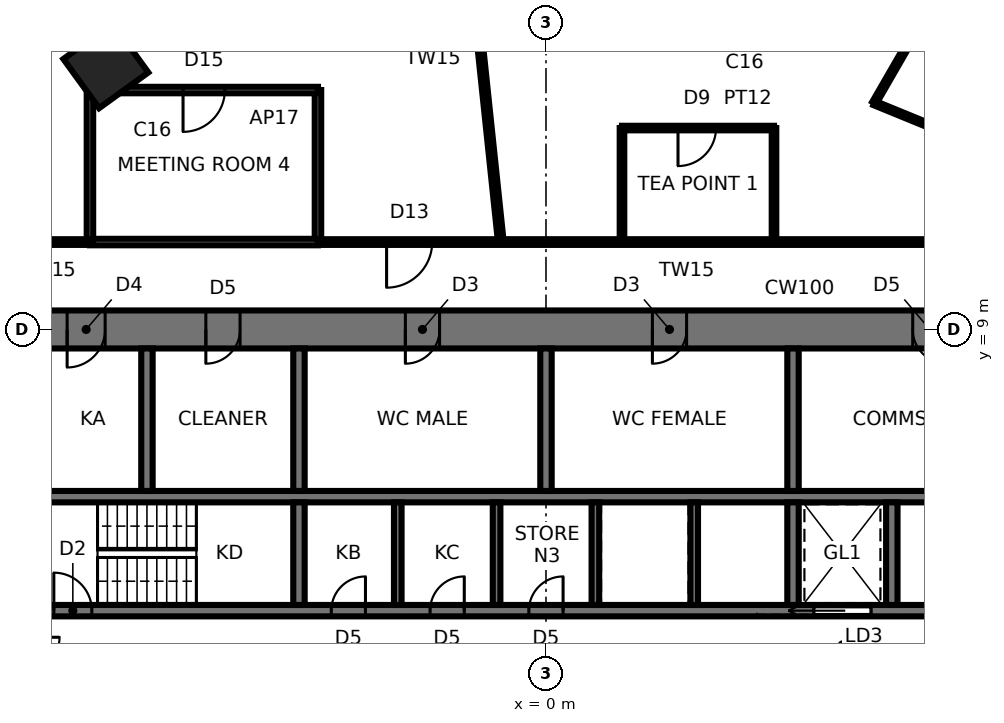
"""IFC4 building model, lengths in metres.
Left out: names, types, materials, properties, quantities, classifications, styles, units other than length and angle.
Written with IfcOpenShell. Run it as: python <this file> out.ifc"""

import sys

from ifc_helpers import new_model, si_unit, direction, frame, frame_2d, origin, origin_2d, place, context, subcontext, project, spatial, rectangle, extrude, element, fill, save


model = new_model("IFC4")
c1 = context("Model", 3, precision=1e-05, world=origin(), true_north=direction((0.0, 1.0)))
c2 = subcontext(c1, "Body", "Model", "MODEL_VIEW")
j1 = project(units=[si_unit("LENGTHUNIT", "METRE"), si_unit("PLANEANGLEUNIT", "RADIAN")], contexts=[c1])
p1 = place(None, origin())
s1 = spatial("IfcSite", under=j1, at=p1, CompositionType="ELEMENT")
p2 = place(p1, origin())
s2 = spatial("IfcBuilding", under=s1, at=p2, CompositionType="ELEMENT")
p3 = place(p2, frame((0.0, 0.0, 127.5)))
s3 = spatial("IfcBuildingStorey", under=s2, at=p3, CompositionType="ELEMENT", Elevation=127.5)
p4 = place(p3, frame((-11.581, 15.94, 0.0), z_axis=(0.0, 0.0, 1.0), x_axis=(-0.587785252292, 0.809016994375, 0.0)))
e1 = element("IfcColumn", 1, at=p4, inside=s3, PredefinedType="COLUMN", context=c2, shape_type="SweptSolid", body=[
    extrude(rectangle(XDim=1.6, YDim=1.6, at=origin_2d()), origin(), (0.0, 0.0, 1.0), 3.9),
])
p5 = place(p3, frame((13.2, 9.0, 0.0), z_axis=(0.0, 0.0, 1.0), x_axis=(-1.0, 0.0, 0.0)))
e2 = element("IfcWall", 2, at=p5, inside=s3, PredefinedType="SHEAR", context=c2, shape_type="SweptSolid", body=[
    extrude(rectangle(XDim=26.4, YDim=1.0, at=frame_2d((13.2, 0.0))), origin(), (0.0, 0.0, 1.0), 3.9),
])
p6 = place(p5, frame((2.65, 0.0, 0.0)))
e3 = element("IfcOpeningElement", 3, at=p6, cuts=e2, PredefinedType="OPENING", context=c2, shape_type="SweptSolid", body=[
    extrude(rectangle(XDim=0.9, YDim=2.1, at=frame_2d((0.45, 1.05))), frame((0.0, 0.51, 0.0), z_axis=(0.0, -1.0, 0.0), x_axis=(1.0, 0.0, 0.0)), (0.0, 0.0, 1.0), 1.02),
])
p7 = place(p5, frame((9.5, 0.0, 0.0)))
e4 = element("IfcOpeningElement", 4, at=p7, cuts=e2, PredefinedType="OPENING", context=c2, shape_type="SweptSolid", body=[
    extrude(rectangle(XDim=0.9, YDim=2.1, at=frame_2d((0.45, 1.05))), frame((0.0, 0.51, 0.0), z_axis=(0.0, -1.0, 0.0), x_axis=(1.0, 0.0, 0.0)), (0.0, 0.0, 1.0), 1.02),
])
p8 = place(p5, frame((16.0, 0.0, 0.0)))
e5 = element("IfcOpeningElement", 5, at=p8, cuts=e2, PredefinedType="OPENING", context=c2, shape_type="SweptSolid", body=[
    extrude(rectangle(XDim=0.9, YDim=2.1, at=frame_2d((0.45, 1.05))), frame((0.0, 0.51, 0.0), z_axis=(0.0, -1.0, 0.0), x_axis=(1.0, 0.0, 0.0)), (0.0, 0.0, 1.0), 1.02),
])
p9 = place(p5, frame((21.25, 0.0, 0.0)))
e6 = element("IfcOpeningElement", 6, at=p9, cuts=e2, PredefinedType="OPENING", context=c2, shape_type="SweptSolid", body=[
    extrude(rectangle(XDim=0.9, YDim=2.1, at=frame_2d((0.45, 1.05))), frame((0.0, 0.51, 0.0), z_axis=(0.0, -1.0, 0.0), x_axis=(1.0, 0.0, 0.0)), (0.0, 0.0, 1.0), 1.02),
])
p10 = place(p5, frame((24.8, 0.0, 0.0)))
e7 = element("IfcOpeningElement", 7, at=p10, cuts=e2, PredefinedType="OPENING", context=c2, shape_type="SweptSolid", body=[
    extrude(rectangle(XDim=1.0, YDim=2.1, at=frame_2d((0.5, 1.05))), frame((0.0, 0.51, 0.0), z_axis=(0.0, -1.0, 0.0), x_axis=(1.0, 0.0, 0.0)), (0.0, 0.0, 1.0), 1.02),
])
p11 = place(p3, frame((-13.2, 1.6, 0.0), z_axis=(0.0, 0.0, 1.0), x_axis=(1.0, 0.0, 0.0)))
e8 = element("IfcWall", 8, at=p11, inside=s3, PredefinedType="SHEAR", context=c2, shape_type="SweptSolid", body=[
    extrude(rectangle(XDim=26.4, YDim=0.3, at=frame_2d((13.2, 0.0))), origin(), (0.0, 0.0, 1.0), 3.9),
])
p12 = place(p11, frame((0.25, 0.0, 0.0)))
e9 = element("IfcOpeningElement", 9, at=p12, cuts=e8, PredefinedType="OPENING", context=c2, shape_type="SweptSolid", body=[
    extrude(rectangle(XDim=1.0, YDim=2.1, at=frame_2d((0.5, 1.05))), frame((0.0, 0.16, 0.0), z_axis=(0.0, -1.0, 0.0), x_axis=(1.0, 0.0, 0.0)), (0.0, 0.0, 1.0), 0.32),
])
p13 = place(p11, frame((20.25, 0.0, 0.0)))
e10 = element("IfcOpeningElement", 10, at=p13, cuts=e8, PredefinedType="OPENING", context=c2, shape_type="SweptSolid", body=[
    extrude(rectangle(XDim=1.5, YDim=2.4, at=frame_2d((0.75, 1.2))), frame((0.0, 0.16, 0.0), z_axis=(0.0, -1.0, 0.0), x_axis=(1.0, 0.0, 0.0)), (0.0, 0.0, 1.0), 0.32),
])
p14 = place(p11, frame((7.55, 0.0, 0.0)))
e11 = element("IfcOpeningElement", 11, at=p14, cuts=e8, PredefinedType="OPENING", context=c2, shape_type="SweptSolid", body=[
    extrude(rectangle(XDim=0.9, YDim=2.1, at=frame_2d((0.45, 1.05))), frame((0.0, 0.16, 0.0), z_axis=(0.0, -1.0, 0.0), x_axis=(1.0, 0.0, 0.0)), (0.0, 0.0, 1.0), 0.32),
])
p15 = place(p11, frame((10.15, 0.0, 0.0)))
e12 = element("IfcOpeningElement", 12, at=p15, cuts=e8, PredefinedType="OPENING", context=c2, shape_type="SweptSolid", body=[
    extrude(rectangle(XDim=0.9, YDim=2.1, at=frame_2d((0.45, 1.05))), frame((0.0, 0.16, 0.0), z_axis=(0.0, -1.0, 0.0), x_axis=(1.0, 0.0, 0.0)), (0.0, 0.0, 1.0), 0.32),
])
p16 = place(p11, frame((12.75, 0.0, 0.0)))
e13 = element("IfcOpeningElement", 13, at=p16, cuts=e8, PredefinedType="OPENING", context=c2, shape_type="SweptSolid", body=[
    extrude(rectangle(XDim=0.9, YDim=2.1, at=frame_2d((0.45, 1.05))), frame((0.0, 0.16, 0.0), z_axis=(0.0, -1.0, 0.0), x_axis=(1.0, 0.0, 0.0)), (0.0, 0.0, 1.0), 0.32),
])
p17 = place(p11, frame((24.15, 0.0, 0.0)))
e14 = element("IfcOpeningElement", 14, at=p17, cuts=e8, PredefinedType="OPENING", context=c2, shape_type="SweptSolid", body=[
    extrude(rectangle(XDim=0.9, YDim=2.1, at=frame_2d((0.45, 1.05))), frame((0.0, 0.16, 0.0), z_axis=(0.0, -1.0, 0.0), x_axis=(1.0, 0.0, 0.0)), (0.0, 0.0, 1.0), 0.32),
])
p18 = place(p3, frame((-13.2, 4.6, 0.0), z_axis=(0.0, 0.0, 1.0), x_axis=(1.0, 0.0, 0.0)))
e15 = element("IfcWall", 15, at=p18, inside=s3, PredefinedType="SHEAR", context=c2, shape_type="SweptSolid", body=[
    extrude(rectangle(XDim=26.4, YDim=0.3, at=frame_2d((13.2, 0.0))), origin(), (0.0, 0.0, 1.0), 3.9),
])
p19 = place(p3, frame((-6.5, 1.75, 0.0), z_axis=(0.0, 0.0, 1.0), x_axis=(0.0, 1.0, 0.0)))
e16 = element("IfcWall", 16, at=p19, inside=s3, PredefinedType="SHEAR", context=c2, shape_type="SweptSolid", body=[
    extrude(rectangle(XDim=2.7, YDim=0.3, at=frame_2d((1.35, 0.0))), origin(), (0.0, 0.0, 1.0), 3.9),
])
p20 = place(p3, frame((-6.5, 4.75, 0.0), z_axis=(0.0, 0.0, 1.0), x_axis=(0.0, 1.0, 0.0)))
e17 = element("IfcWall", 17, at=p20, inside=s3, PredefinedType="SHEAR", context=c2, shape_type="SweptSolid", body=[
    extrude(rectangle(XDim=3.75, YDim=0.3, at=frame_2d((1.875, 0.0))), origin(), (0.0, 0.0, 1.0), 3.9),
])
p21 = place(p3, frame((6.5, 1.75, 0.0), z_axis=(0.0, 0.0, 1.0), x_axis=(0.0, 1.0, 0.0)))
e18 = element("IfcWall", 18, at=p21, inside=s3, PredefinedType="SHEAR", context=c2, shape_type="SweptSolid", body=[
    extrude(rectangle(XDim=2.7, YDim=0.3, at=frame_2d((1.35, 0.0))), origin(), (0.0, 0.0, 1.0), 3.9),
])
p22 = place(p3, frame((6.5, 4.75, 0.0), z_axis=(0.0, 0.0, 1.0), x_axis=(0.0, 1.0, 0.0)))
e19 = element("IfcWall", 19, at=p22, inside=s3, PredefinedType="SHEAR", context=c2, shape_type="SweptSolid", body=[
    extrude(rectangle(XDim=3.75, YDim=0.3, at=frame_2d((1.875, 0.0))), origin(), (0.0, 0.0, 1.0), 3.9),
])
for number, where, z_axis, x_axis in (
    (20, (-3.9, 1.75, 0.0), (0.0, 0.0, 1.0), (0.0, 1.0, 0.0)),
    (21, (-1.3, 1.75, 0.0), (0.0, 0.0, 1.0), (0.0, 1.0, 0.0)),
    (22, (1.3, 1.75, 0.0), (0.0, 0.0, 1.0), (0.0, 1.0, 0.0)),
    (23, (3.9, 1.75, 0.0), (0.0, 0.0, 1.0), (0.0, 1.0, 0.0)),
):
    element("IfcWall", number, at=place(p3, frame(where, z_axis=z_axis, x_axis=x_axis)), inside=s3, PredefinedType="SHEAR", context=c2, shape_type="SweptSolid", body=[
        extrude(rectangle(XDim=2.7, YDim=0.2, at=frame_2d((1.35, 0.0))), origin(), (0.0, 0.0, 1.0), 3.9),
    ])
for number, where, z_axis, x_axis in (
    (24, (0.0, 4.75, 0.0), (0.0, 0.0, 1.0), (0.0, 1.0, 0.0)),
    (25, (-10.5, 4.75, 0.0), (0.0, 0.0, 1.0), (0.0, 1.0, 0.0)),
):
    element("IfcWall", number, at=place(p3, frame(where, z_axis=z_axis, x_axis=x_axis)), inside=s3, PredefinedType="SHEAR", context=c2, shape_type="SweptSolid", body=[
        extrude(rectangle(XDim=3.75, YDim=0.3, at=frame_2d((1.875, 0.0))), origin(), (0.0, 0.0, 1.0), 3.9),
    ])
p23 = place(p3, frame((9.1, 1.75, 0.0), z_axis=(0.0, 0.0, 1.0), x_axis=(0.0, 1.0, 0.0)))
e26 = element("IfcWall", 26, at=p23, inside=s3, PredefinedType="SHEAR", context=c2, shape_type="SweptSolid", body=[
    extrude(rectangle(XDim=2.7, YDim=0.3, at=frame_2d((1.35, 0.0))), origin(), (0.0, 0.0, 1.0), 3.9),
])
p24 = place(p3, frame((8.637, 14.959, 0.0), z_axis=(0.0, 0.0, 1.0), x_axis=(0.925323544258, -0.379178504719, 0.0)))
e27 = element("IfcWall", 27, at=p24, inside=s3, PredefinedType="PARTITIONING", context=c2, shape_type="SweptSolid", body=[
    extrude(rectangle(XDim=3.815, YDim=0.12, at=frame_2d((1.907, 0.0))), origin(), (0.0, 0.0, 1.0), 3.74),
])
p25 = place(p3, frame((11.137, 19.289, 0.0), z_axis=(0.0, 0.0, 1.0), x_axis=(-0.499983091616, -0.866035165624, 0.0)))
e28 = element("IfcWall", 28, at=p25, inside=s3, PredefinedType="PARTITIONING", context=c2, shape_type="SweptSolid", body=[
    extrude(rectangle(XDim=5.0, YDim=0.12, at=frame_2d((2.5, 0.0))), origin(), (0.0, 0.0, 1.0), 3.74),
])
p26 = place(p3, frame((6.0, 11.3, 0.0), z_axis=(0.0, 0.0, 1.0), x_axis=(0.0, 1.0, 0.0)))
e29 = element("IfcWall", 29, at=p26, inside=s3, PredefinedType="PARTITIONING", context=c2, shape_type="SweptSolid", body=[
    extrude(rectangle(XDim=3.0, YDim=0.12, at=frame_2d((1.5, 0.0))), origin(), (0.0, 0.0, 1.0), 3.74),
])
p27 = place(p3, frame((16.0, 11.3, 0.0), z_axis=(0.0, 0.0, 1.0), x_axis=(-1.0, 0.0, 0.0)))
e30 = element("IfcWall", 30, at=p27, inside=s3, PredefinedType="PARTITIONING", context=c2, shape_type="SweptSolid", body=[
    extrude(rectangle(XDim=22.0, YDim=0.15, at=frame_2d((11.0, 0.0))), origin(), (0.0, 0.0, 1.0), 3.74),
])
p28 = place(p27, frame((4.4, 0.0, 0.0)))
e31 = element("IfcOpeningElement", 31, at=p28, cuts=e30, PredefinedType="OPENING", context=c2, shape_type="SweptSolid", body=[
    extrude(rectangle(XDim=1.2, YDim=2.4, at=frame_2d((0.6, 1.2))), frame((0.0, 0.085, 0.0), z_axis=(0.0, -1.0, 0.0), x_axis=(1.0, 0.0, 0.0)), (0.0, 0.0, 1.0), 0.17),
])
p29 = place(p27, frame((18.994, 0.0, 0.0)))
e32 = element("IfcOpeningElement", 32, at=p29, cuts=e30, PredefinedType="OPENING", context=c2, shape_type="SweptSolid", body=[
    extrude(rectangle(XDim=1.2, YDim=2.4, at=frame_2d((0.6, 1.2))), frame((0.0, 0.085, 0.0), z_axis=(0.0, -1.0, 0.0), x_axis=(1.0, 0.0, 0.0)), (0.0, 0.0, 1.0), 0.17),
])
p30 = place(p3, frame((6.0, 14.3, 0.0), z_axis=(0.0, 0.0, 1.0), x_axis=(-1.0, 0.0, 0.0)))
e33 = element("IfcWall", 33, at=p30, inside=s3, PredefinedType="PARTITIONING", context=c2, shape_type="SweptSolid", body=[
    extrude(rectangle(XDim=4.0, YDim=0.12, at=frame_2d((2.0, 0.0))), origin(), (0.0, 0.0, 1.0), 3.74),
])
p31 = place(p30, frame((1.526, 0.0, 0.0)))
e34 = element("IfcOpeningElement", 34, at=p31, cuts=e33, PredefinedType="OPENING", context=c2, shape_type="SweptSolid", body=[
    extrude(rectangle(XDim=1.0, YDim=2.4, at=frame_2d((0.5, 1.2))), frame((0.0, 0.07, 0.0), z_axis=(0.0, -1.0, 0.0), x_axis=(1.0, 0.0, 0.0)), (0.0, 0.0, 1.0), 0.14),
])
p32 = place(p3, frame((2.0, 14.3, 0.0), z_axis=(0.0, 0.0, 1.0), x_axis=(0.0, -1.0, 0.0)))
e35 = element("IfcWall", 35, at=p32, inside=s3, PredefinedType="PARTITIONING", context=c2, shape_type="SweptSolid", body=[
    extrude(rectangle(XDim=3.0, YDim=0.12, at=frame_2d((1.5, 0.0))), origin(), (0.0, 0.0, 1.0), 3.74),
])
p33 = place(p3, frame((-1.188, 11.3, 0.0), z_axis=(0.0, 0.0, 1.0), x_axis=(-0.104522843542, 0.994522486009, 0.0)))
e36 = element("IfcWall", 36, at=p33, inside=s3, PredefinedType="PARTITIONING", context=c2, shape_type="SweptSolid", body=[
    extrude(rectangle(XDim=9.967, YDim=0.15, at=frame_2d((4.983, 0.0))), origin(), (0.0, 0.0, 1.0), 3.74),
])
p34 = place(p3, frame((-6.0, 11.3, 0.0), z_axis=(0.0, 0.0, 1.0), x_axis=(0.0, 1.0, 0.0)))
e37 = element("IfcWall", 37, at=p34, inside=s3, PredefinedType="PARTITIONING", context=c2, shape_type="SweptSolid", body=[
    extrude(rectangle(XDim=4.0, YDim=0.17, at=frame_2d((2.0, 0.0))), origin(), (0.0, 0.0, 1.0), 3.74),
])
p35 = place(p3, frame((-6.0, 15.3, 0.0), z_axis=(0.0, 0.0, 1.0), x_axis=(-1.0, 0.0, 0.0)))
e38 = element("IfcWall", 38, at=p35, inside=s3, PredefinedType="PARTITIONING", context=c2, shape_type="SweptSolid", body=[
    extrude(rectangle(XDim=6.0, YDim=0.17, at=frame_2d((3.0, 0.0))), origin(), (0.0, 0.0, 1.0), 3.74),
])
p36 = place(p35, frame((2.45, 0.0, 0.0)))
e39 = element("IfcOpeningElement", 39, at=p36, cuts=e38, PredefinedType="OPENING", context=c2, shape_type="SweptSolid", body=[
    extrude(rectangle(XDim=1.1, YDim=2.4, at=frame_2d((0.55, 1.2))), frame((0.0, 0.095, 0.0), z_axis=(0.0, -1.0, 0.0), x_axis=(1.0, 0.0, 0.0)), (0.0, 0.0, 1.0), 0.19),
])
p37 = place(p3, frame((-12.0, 11.3, 0.0), z_axis=(0.0, 0.0, 1.0), x_axis=(1.0, 0.0, 0.0)))
e40 = element("IfcWall", 40, at=p37, inside=s3, PredefinedType="PARTITIONING", context=c2, shape_type="SweptSolid", body=[
    extrude(rectangle(XDim=6.0, YDim=0.17, at=frame_2d((3.0, 0.0))), origin(), (0.0, 0.0, 1.0), 3.74),
])
p38 = place(p3, frame((-12.0, 15.3, 0.0), z_axis=(0.0, 0.0, 1.0), x_axis=(0.0, -1.0, 0.0)))
e41 = element("IfcWall", 41, at=p38, inside=s3, PredefinedType="PARTITIONING", context=c2, shape_type="SweptSolid", body=[
    extrude(rectangle(XDim=4.0, YDim=0.17, at=frame_2d((2.0, 0.0))), origin(), (0.0, 0.0, 1.0), 3.74),
])
p39 = place(p3, frame((-12.0, 11.3, 0.0), z_axis=(0.0, 0.0, 1.0), x_axis=(-1.0, 0.0, 0.0)))
e42 = element("IfcWall", 42, at=p39, inside=s3, PredefinedType="PARTITIONING", context=c2, shape_type="SweptSolid", body=[
    extrude(rectangle(XDim=2.2, YDim=0.15, at=frame_2d((1.1, 0.0))), origin(), (0.0, 0.0, 1.0), 3.74),
])
p40 = place(p12, origin())
e43 = element("IfcDoor", 43, at=p40, inside=s3, OperationType="SINGLE_SWING_LEFT", PredefinedType="DOOR", context=c2, shape_type="SweptSolid", body=[
    extrude(rectangle(XDim=1.0, YDim=2.1, at=frame_2d((0.5, 1.05))), frame((0.0, 0.025, 0.0), z_axis=(0.0, -1.0, 0.0), x_axis=(1.0, 0.0, 0.0)), (0.0, 0.0, 1.0), 0.05),
])
fill(e9, e43)
p41 = place(p13, origin())
e44 = element("IfcDoor", 44, at=p41, inside=s3, OperationType="SLIDING_TO_LEFT", PredefinedType="DOOR", context=c2, shape_type="SweptSolid", body=[
    extrude(rectangle(XDim=1.5, YDim=2.4, at=frame_2d((0.75, 1.2))), frame((0.0, 0.025, 0.0), z_axis=(0.0, -1.0, 0.0), x_axis=(1.0, 0.0, 0.0)), (0.0, 0.0, 1.0), 0.05),
])
fill(e10, e44)
p42 = place(p14, origin())
e45 = element("IfcDoor", 45, at=p42, inside=s3, OperationType="SINGLE_SWING_RIGHT", PredefinedType="DOOR", context=c2, shape_type="SweptSolid", body=[
    extrude(rectangle(XDim=0.9, YDim=2.1, at=frame_2d((0.45, 1.05))), frame((0.0, 0.025, 0.0), z_axis=(0.0, -1.0, 0.0), x_axis=(1.0, 0.0, 0.0)), (0.0, 0.0, 1.0), 0.05),
])
fill(e11, e45)
p43 = place(p15, origin())
e46 = element("IfcDoor", 46, at=p43, inside=s3, OperationType="SINGLE_SWING_RIGHT", PredefinedType="DOOR", context=c2, shape_type="SweptSolid", body=[
    extrude(rectangle(XDim=0.9, YDim=2.1, at=frame_2d((0.45, 1.05))), frame((0.0, 0.025, 0.0), z_axis=(0.0, -1.0, 0.0), x_axis=(1.0, 0.0, 0.0)), (0.0, 0.0, 1.0), 0.05),
])
fill(e12, e46)
p44 = place(p16, origin())
e47 = element("IfcDoor", 47, at=p44, inside=s3, OperationType="SINGLE_SWING_RIGHT", PredefinedType="DOOR", context=c2, shape_type="SweptSolid", body=[
    extrude(rectangle(XDim=0.9, YDim=2.1, at=frame_2d((0.45, 1.05))), frame((0.0, 0.025, 0.0), z_axis=(0.0, -1.0, 0.0), x_axis=(1.0, 0.0, 0.0)), (0.0, 0.0, 1.0), 0.05),
])
fill(e13, e47)
p45 = place(p6, origin())
e48 = element("IfcDoor", 48, at=p45, inside=s3, OperationType="SINGLE_SWING_LEFT", PredefinedType="DOOR", context=c2, shape_type="SweptSolid", body=[
    extrude(rectangle(XDim=0.82, YDim=2.06, at=frame_2d((0.45, 1.03))), frame((0.0, 0.025, 0.0), z_axis=(0.0, -1.0, 0.0), x_axis=(1.0, 0.0, 0.0)), (0.0, 0.0, 1.0), 0.05),
    extrude(rectangle(XDim=0.04, YDim=2.1, at=frame_2d((0.02, 1.05))), frame((0.0, 0.25, 0.0), z_axis=(0.0, -1.0, 0.0), x_axis=(1.0, 0.0, 0.0)), (0.0, 0.0, 1.0), 0.5),
    extrude(rectangle(XDim=0.04, YDim=2.1, at=frame_2d((0.88, 1.05))), frame((0.0, 0.25, 0.0), z_axis=(0.0, -1.0, 0.0), x_axis=(1.0, 0.0, 0.0)), (0.0, 0.0, 1.0), 0.5),
    extrude(rectangle(XDim=0.82, YDim=0.04, at=frame_2d((0.45, 2.08))), frame((0.0, 0.25, 0.0), z_axis=(0.0, -1.0, 0.0), x_axis=(1.0, 0.0, 0.0)), (0.0, 0.0, 1.0), 0.5),
])
fill(e3, e48)
p46 = place(p7, origin())
e49 = element("IfcDoor", 49, at=p46, inside=s3, OperationType="SINGLE_SWING_RIGHT", PredefinedType="DOOR", context=c2, shape_type="SweptSolid", body=[
    extrude(rectangle(XDim=0.82, YDim=2.06, at=frame_2d((0.45, 1.03))), frame((0.0, 0.025, 0.0), z_axis=(0.0, -1.0, 0.0), x_axis=(1.0, 0.0, 0.0)), (0.0, 0.0, 1.0), 0.05),
    extrude(rectangle(XDim=0.04, YDim=2.1, at=frame_2d((0.02, 1.05))), frame((0.0, 0.25, 0.0), z_axis=(0.0, -1.0, 0.0), x_axis=(1.0, 0.0, 0.0)), (0.0, 0.0, 1.0), 0.5),
    extrude(rectangle(XDim=0.04, YDim=2.1, at=frame_2d((0.88, 1.05))), frame((0.0, 0.25, 0.0), z_axis=(0.0, -1.0, 0.0), x_axis=(1.0, 0.0, 0.0)), (0.0, 0.0, 1.0), 0.5),
    extrude(rectangle(XDim=0.82, YDim=0.04, at=frame_2d((0.45, 2.08))), frame((0.0, 0.25, 0.0), z_axis=(0.0, -1.0, 0.0), x_axis=(1.0, 0.0, 0.0)), (0.0, 0.0, 1.0), 0.5),
])
fill(e4, e49)
p47 = place(p8, origin())
e50 = element("IfcDoor", 50, at=p47, inside=s3, OperationType="SINGLE_SWING_RIGHT", PredefinedType="DOOR", context=c2, shape_type="SweptSolid", body=[
    extrude(rectangle(XDim=0.82, YDim=2.06, at=frame_2d((0.45, 1.03))), frame((0.0, 0.025, 0.0), z_axis=(0.0, -1.0, 0.0), x_axis=(1.0, 0.0, 0.0)), (0.0, 0.0, 1.0), 0.05),
    extrude(rectangle(XDim=0.04, YDim=2.1, at=frame_2d((0.02, 1.05))), frame((0.0, 0.25, 0.0), z_axis=(0.0, -1.0, 0.0), x_axis=(1.0, 0.0, 0.0)), (0.0, 0.0, 1.0), 0.5),
    extrude(rectangle(XDim=0.04, YDim=2.1, at=frame_2d((0.88, 1.05))), frame((0.0, 0.25, 0.0), z_axis=(0.0, -1.0, 0.0), x_axis=(1.0, 0.0, 0.0)), (0.0, 0.0, 1.0), 0.5),
    extrude(rectangle(XDim=0.82, YDim=0.04, at=frame_2d((0.45, 2.08))), frame((0.0, 0.25, 0.0), z_axis=(0.0, -1.0, 0.0), x_axis=(1.0, 0.0, 0.0)), (0.0, 0.0, 1.0), 0.5),
])
fill(e5, e50)
p48 = place(p9, origin())
e51 = element("IfcDoor", 51, at=p48, inside=s3, OperationType="SINGLE_SWING_RIGHT", PredefinedType="DOOR", context=c2, shape_type="SweptSolid", body=[
    extrude(rectangle(XDim=0.82, YDim=2.06, at=frame_2d((0.45, 1.03))), frame((0.0, 0.025, 0.0), z_axis=(0.0, -1.0, 0.0), x_axis=(1.0, 0.0, 0.0)), (0.0, 0.0, 1.0), 0.05),
    extrude(rectangle(XDim=0.04, YDim=2.1, at=frame_2d((0.02, 1.05))), frame((0.0, 0.25, 0.0), z_axis=(0.0, -1.0, 0.0), x_axis=(1.0, 0.0, 0.0)), (0.0, 0.0, 1.0), 0.5),
    extrude(rectangle(XDim=0.04, YDim=2.1, at=frame_2d((0.88, 1.05))), frame((0.0, 0.25, 0.0), z_axis=(0.0, -1.0, 0.0), x_axis=(1.0, 0.0, 0.0)), (0.0, 0.0, 1.0), 0.5),
    extrude(rectangle(XDim=0.82, YDim=0.04, at=frame_2d((0.45, 2.08))), frame((0.0, 0.25, 0.0), z_axis=(0.0, -1.0, 0.0), x_axis=(1.0, 0.0, 0.0)), (0.0, 0.0, 1.0), 0.5),
])
fill(e6, e51)
p49 = place(p10, origin())
e52 = element("IfcDoor", 52, at=p49, inside=s3, OperationType="SINGLE_SWING_RIGHT", PredefinedType="DOOR", context=c2, shape_type="SweptSolid", body=[
    extrude(rectangle(XDim=0.92, YDim=2.06, at=frame_2d((0.5, 1.03))), frame((0.0, 0.025, 0.0), z_axis=(0.0, -1.0, 0.0), x_axis=(1.0, 0.0, 0.0)), (0.0, 0.0, 1.0), 0.05),
    extrude(rectangle(XDim=0.04, YDim=2.1, at=frame_2d((0.02, 1.05))), frame((0.0, 0.25, 0.0), z_axis=(0.0, -1.0, 0.0), x_axis=(1.0, 0.0, 0.0)), (0.0, 0.0, 1.0), 0.5),
    extrude(rectangle(XDim=0.04, YDim=2.1, at=frame_2d((0.98, 1.05))), frame((0.0, 0.25, 0.0), z_axis=(0.0, -1.0, 0.0), x_axis=(1.0, 0.0, 0.0)), (0.0, 0.0, 1.0), 0.5),
    extrude(rectangle(XDim=0.92, YDim=0.04, at=frame_2d((0.5, 2.08))), frame((0.0, 0.25, 0.0), z_axis=(0.0, -1.0, 0.0), x_axis=(1.0, 0.0, 0.0)), (0.0, 0.0, 1.0), 0.5),
])
fill(e7, e52)
p50 = place(p31, origin())
e53 = element("IfcDoor", 53, at=p50, inside=s3, OperationType="SINGLE_SWING_RIGHT", PredefinedType="DOOR", context=c2, shape_type="SweptSolid", body=[
    extrude(rectangle(XDim=1.0, YDim=2.4, at=frame_2d((0.5, 1.2))), frame((0.0, 0.025, 0.0), z_axis=(0.0, -1.0, 0.0), x_axis=(1.0, 0.0, 0.0)), (0.0, 0.0, 1.0), 0.05),
])
fill(e34, e53)
p51 = place(p36, origin())
e54 = element("IfcDoor", 54, at=p51, inside=s3, OperationType="SINGLE_SWING_RIGHT", PredefinedType="DOOR", context=c2, shape_type="SweptSolid", body=[
    extrude(rectangle(XDim=1.1, YDim=2.4, at=frame_2d((0.55, 1.2))), frame((0.0, 0.025, 0.0), z_axis=(0.0, -1.0, 0.0), x_axis=(1.0, 0.0, 0.0)), (0.0, 0.0, 1.0), 0.05),
])
fill(e39, e54)
p52 = place(p29, origin())
e55 = element("IfcDoor", 55, at=p52, inside=s3, OperationType="SINGLE_SWING_RIGHT", PredefinedType="DOOR", context=c2, shape_type="SweptSolid", body=[
    extrude(rectangle(XDim=1.2, YDim=2.4, at=frame_2d((0.6, 1.2))), frame((0.0, 0.025, 0.0), z_axis=(0.0, -1.0, 0.0), x_axis=(1.0, 0.0, 0.0)), (0.0, 0.0, 1.0), 0.05),
])
fill(e32, e55)
save(model, sys.argv[1])
